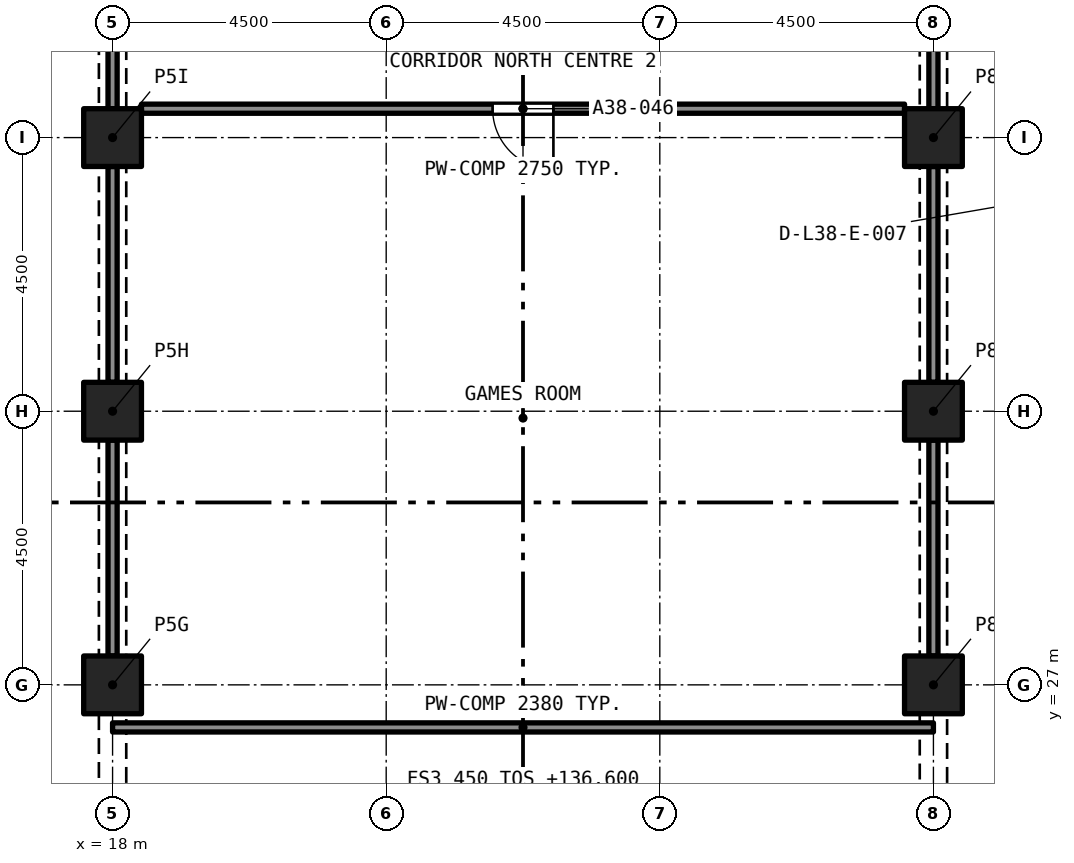
"""IFC4 building model, lengths in metres.
Left out: names, types, materials, properties, quantities, classifications, styles, units other than length and angle.
Written with IfcOpenShell. Run it as: python <this file> out.ifc"""

import sys

from ifc_helpers import new_model, si_unit, direction, frame, frame_2d, origin, origin_2d, place, context, subcontext, project, spatial, rectangle, extrude, element, fill, save


model = new_model("IFC4")
c1 = context("Model", 3, precision=1e-05, world=origin(), true_north=direction((0.0, 1.0)))
c2 = subcontext(c1, "Body", "Model", "MODEL_VIEW")
j1 = project(units=[si_unit("LENGTHUNIT", "METRE"), si_unit("PLANEANGLEUNIT", "RADIAN")], contexts=[c1])
p1 = place(None, origin())
s1 = spatial("IfcSite", under=j1, at=p1, CompositionType="ELEMENT")
p2 = place(p1, origin())
s2 = spatial("IfcBuilding", under=s1, at=p2, CompositionType="ELEMENT")
p3 = place(p2, frame((0.0, 0.0, 136.6)))
s3 = spatial("IfcBuildingStorey", under=s2, at=p3, CompositionType="ELEMENT", Elevation=136.6)
for number, where, z_axis, x_axis in (
    (1, (18.0, 27.0, 0.0), (0.0, 0.0, 1.0), (1.0, 0.0, 0.0)),
    (2, (31.5, 27.0, 0.0), (0.0, 0.0, 1.0), (1.0, 0.0, 0.0)),
    (3, (18.0, 31.5, 0.0), (0.0, 0.0, 1.0), (1.0, 0.0, 0.0)),
    (4, (31.5, 31.5, 0.0), (0.0, 0.0, 1.0), (1.0, 0.0, 0.0)),
    (5, (18.0, 36.0, 0.0), (0.0, 0.0, 1.0), (1.0, 0.0, 0.0)),
    (6, (31.5, 36.0, 0.0), (0.0, 0.0, 1.0), (1.0, 0.0, 0.0)),
):
    element("IfcColumn", number, at=place(p3, frame(where, z_axis=z_axis, x_axis=x_axis)), inside=s3, PredefinedType="COLUMN", context=c2, shape_type="SweptSolid", body=[
        extrude(rectangle(XDim=0.95, YDim=0.95, at=origin_2d()), origin(), (0.0, 0.0, 1.0), 3.2),
    ])
p4 = place(p3, frame((31.025, 36.475, 0.0), z_axis=(0.0, 0.0, 1.0), x_axis=(-1.0, 0.0, 0.0)))
e7 = element("IfcWall", 7, at=p4, inside=s3, PredefinedType="PARTITIONING", context=c2, shape_type="SweptSolid", body=[
    extrude(rectangle(XDim=12.55, YDim=0.15, at=frame_2d((6.275, 0.0))), origin(), (0.0, 0.0, 1.0), 2.75),
])
p5 = place(p4, frame((5.775, 0.0, 0.0)))
e8 = element("IfcOpeningElement", 8, at=p5, cuts=e7, PredefinedType="OPENING", context=c2, shape_type="SweptSolid", body=[
    extrude(rectangle(XDim=1.0, YDim=2.1, at=frame_2d((0.5, 1.05))), frame((0.0, 0.085, 0.0), z_axis=(0.0, -1.0, 0.0), x_axis=(1.0, 0.0, 0.0)), (0.0, 0.0, 1.0), 0.17),
])
p6 = place(p3, frame((31.5, 36.475, 0.0), z_axis=(0.0, 0.0, 1.0), x_axis=(0.0, 1.0, 0.0)))
e9 = element("IfcWall", 9, at=p6, inside=s3, PredefinedType="PARTITIONING", context=c2, shape_type="SweptSolid", body=[
    extrude(rectangle(XDim=3.55, YDim=0.15, at=frame_2d((1.775, 0.0))), origin(), (0.0, 0.0, 1.0), 2.38),
])
p7 = place(p6, frame((1.175, 0.0, 0.0)))
e10 = element("IfcOpeningElement", 10, at=p7, cuts=e9, PredefinedType="OPENING", context=c2, shape_type="SweptSolid", body=[
    extrude(rectangle(XDim=1.2, YDim=2.1, at=frame_2d((0.6, 1.05))), frame((0.0, 0.085, 0.0), z_axis=(0.0, -1.0, 0.0), x_axis=(1.0, 0.0, 0.0)), (0.0, 0.0, 1.0), 0.17),
])
p8 = place(p3, frame((18.0, 40.025, 0.0), z_axis=(0.0, 0.0, 1.0), x_axis=(0.0, -1.0, 0.0)))
e11 = element("IfcWall", 11, at=p8, inside=s3, PredefinedType="PARTITIONING", context=c2, shape_type="SweptSolid", body=[
    extrude(rectangle(XDim=3.55, YDim=0.15, at=frame_2d((1.775, 0.0))), origin(), (0.0, 0.0, 1.0), 2.38),
])
p9 = place(p8, frame((1.175, 0.0, 0.0)))
e12 = element("IfcOpeningElement", 12, at=p9, cuts=e11, PredefinedType="OPENING", context=c2, shape_type="SweptSolid", body=[
    extrude(rectangle(XDim=1.2, YDim=2.1, at=frame_2d((0.6, 1.05))), frame((0.0, 0.085, 0.0), z_axis=(0.0, -1.0, 0.0), x_axis=(1.0, 0.0, 0.0)), (0.0, 0.0, 1.0), 0.17),
])
for number, where, z_axis, x_axis in (
    (13, (31.5, 31.975, 0.0), (0.0, 0.0, 1.0), (0.0, 1.0, 0.0)),
    (14, (31.5, 27.475, 0.0), (0.0, 0.0, 1.0), (0.0, 1.0, 0.0)),
    (15, (18.0, 27.475, 0.0), (0.0, 0.0, 1.0), (0.0, 1.0, 0.0)),
    (16, (18.0, 31.975, 0.0), (0.0, 0.0, 1.0), (0.0, 1.0, 0.0)),
):
    element("IfcWall", number, at=place(p3, frame(where, z_axis=z_axis, x_axis=x_axis)), inside=s3, PredefinedType="PARTITIONING", context=c2, shape_type="SweptSolid", body=[
        extrude(rectangle(XDim=3.55, YDim=0.15, at=frame_2d((1.775, 0.0))), origin(), (0.0, 0.0, 1.0), 2.38),
    ])
p10 = place(p3, frame((18.0, 26.3, 0.0), z_axis=(0.0, 0.0, 1.0), x_axis=(1.0, 0.0, 0.0)))
e17 = element("IfcWall", 17, at=p10, inside=s3, PredefinedType="PARTITIONING", context=c2, shape_type="SweptSolid", body=[
    extrude(rectangle(XDim=13.5, YDim=0.15, at=frame_2d((6.75, 0.0))), origin(), (0.0, 0.0, 1.0), 2.38),
])
p11 = place(p5, origin())
e18 = element("IfcDoor", 18, at=p11, inside=s3, OperationType="SINGLE_SWING_RIGHT", PredefinedType="DOOR", context=c2, shape_type="SweptSolid", body=[
    extrude(rectangle(XDim=1.0, YDim=2.1, at=frame_2d((0.5, 1.05))), frame((0.0, 0.025, 0.0), z_axis=(0.0, -1.0, 0.0), x_axis=(1.0, 0.0, 0.0)), (0.0, 0.0, 1.0), 0.05),
])
fill(e8, e18)
save(model, sys.argv[1])
